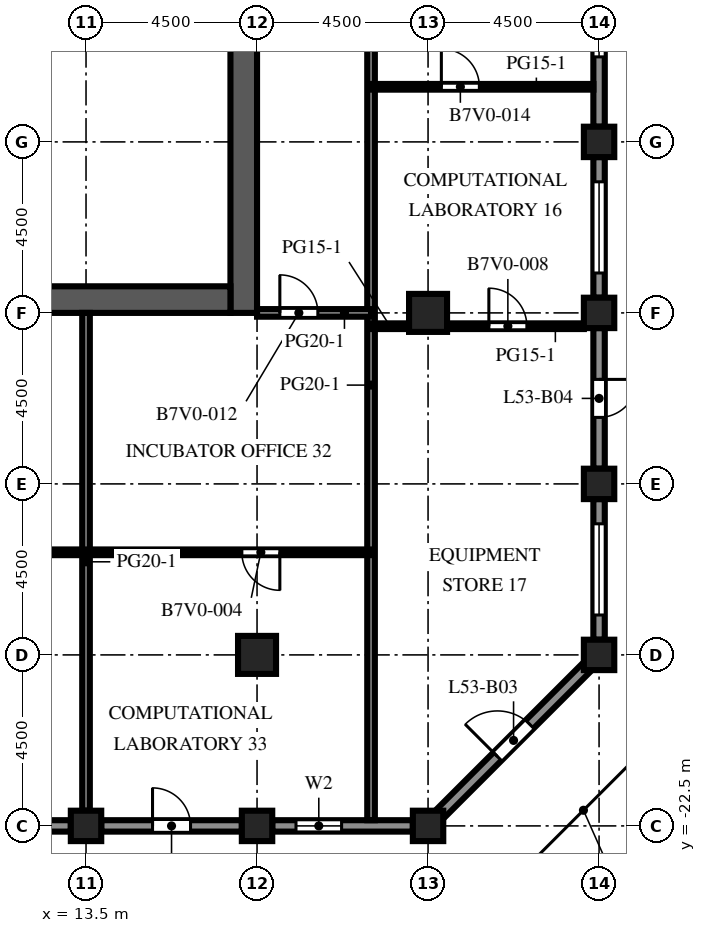
"""IFC4 building model, lengths in metres.
Left out: names, types, materials, properties, quantities, classifications, styles, units other than length and angle.
Written with IfcOpenShell. Run it as: python <this file> out.ifc"""

import sys

from ifc_helpers import new_model, si_unit, direction, frame, frame_2d, origin, origin_2d, place, context, subcontext, project, spatial, rectangle, extrude, element, fill, save


model = new_model("IFC4")
c1 = context("Model", 3, precision=1e-05, world=origin(), true_north=direction((0.0, 1.0)))
c2 = subcontext(c1, "Body", "Model", "MODEL_VIEW")
j1 = project(units=[si_unit("LENGTHUNIT", "METRE"), si_unit("PLANEANGLEUNIT", "RADIAN")], contexts=[c1])
p1 = place(None, origin())
s1 = spatial("IfcSite", under=j1, at=p1, CompositionType="ELEMENT")
p2 = place(p1, origin())
s2 = spatial("IfcBuilding", under=s1, at=p2, CompositionType="ELEMENT")
p3 = place(p2, frame((0.0, 0.0, 235.7)))
s3 = spatial("IfcBuildingStorey", under=s2, at=p3, CompositionType="ELEMENT", Elevation=235.7)
for number, where, z_axis, x_axis in (
    (1, (13.5, -22.5, 0.0), (0.0, 0.0, 1.0), (1.0, 0.0, 0.0)),
    (2, (18.0, -22.5, 0.0), (0.0, 0.0, 1.0), (1.0, 0.0, 0.0)),
    (3, (22.5, -22.5, 0.0), (0.0, 0.0, 1.0), (1.0, 0.0, 0.0)),
    (4, (27.0, -18.0, 0.0), (0.0, 0.0, 1.0), (1.0, 0.0, 0.0)),
    (5, (27.0, -13.5, 0.0), (0.0, 0.0, 1.0), (1.0, 0.0, 0.0)),
    (6, (27.0, -9.0, 0.0), (0.0, 0.0, 1.0), (1.0, 0.0, 0.0)),
    (7, (27.0, -4.5, 0.0), (0.0, 0.0, 1.0), (1.0, 0.0, 0.0)),
):
    element("IfcColumn", number, at=place(p3, frame(where, z_axis=z_axis, x_axis=x_axis)), inside=s3, PredefinedType="COLUMN", context=c2, shape_type="SweptSolid", body=[
        extrude(rectangle(XDim=0.8, YDim=0.8, at=origin_2d()), origin(), (0.0, 0.0, 1.0), 4.1),
    ])
for number, where, z_axis, x_axis in (
    (8, (18.0, -18.0, 0.0), (0.0, 0.0, 1.0), (1.0, 0.0, 0.0)),
    (9, (22.5, -9.0, 0.0), (0.0, 0.0, 1.0), (1.0, 0.0, 0.0)),
):
    element("IfcColumn", number, at=place(p3, frame(where, z_axis=z_axis, x_axis=x_axis)), inside=s3, PredefinedType="COLUMN", context=c2, shape_type="SweptSolid", body=[
        extrude(rectangle(XDim=1.0, YDim=1.0, at=origin_2d()), origin(), (0.0, 0.0, 1.0), 4.1),
    ])
p4 = place(p3, frame((17.65, -9.0, 0.0), z_axis=(0.0, 0.0, 1.0), x_axis=(0.0, 1.0, 0.0)))
e10 = element("IfcWall", 10, at=p4, inside=s3, PredefinedType="SHEAR", context=c2, shape_type="SweptSolid", body=[
    extrude(rectangle(XDim=27.5, YDim=0.7, at=frame_2d((13.75, 0.0))), origin(), (0.0, 0.0, 1.0), 4.1),
])
p5 = place(p4, frame((12.55, 0.0, 0.0)))
e11 = element("IfcOpeningElement", 11, at=p5, cuts=e10, PredefinedType="OPENING", context=c2, shape_type="SweptSolid", body=[
    extrude(rectangle(XDim=2.4, YDim=2.4, at=frame_2d((1.2, 1.2))), frame((0.0, 0.36, 0.0), z_axis=(0.0, -1.0, 0.0), x_axis=(1.0, 0.0, 0.0)), (0.0, 0.0, 1.0), 0.72),
])
p6 = place(p4, frame((6.825, 0.0, 0.0)))
e12 = element("IfcOpeningElement", 12, at=p6, cuts=e10, PredefinedType="OPENING", context=c2, shape_type="SweptSolid", body=[
    extrude(rectangle(XDim=1.2, YDim=2.1, at=frame_2d((0.6, 1.05))), frame((0.0, 0.36, 0.0), z_axis=(0.0, -1.0, 0.0), x_axis=(1.0, 0.0, 0.0)), (0.0, 0.0, 1.0), 0.72),
])
p7 = place(p4, frame((19.475, 0.0, 0.0)))
e13 = element("IfcOpeningElement", 13, at=p7, cuts=e10, PredefinedType="OPENING", context=c2, shape_type="SweptSolid", body=[
    extrude(rectangle(XDim=1.2, YDim=2.1, at=frame_2d((0.6, 1.05))), frame((0.0, 0.36, 0.0), z_axis=(0.0, -1.0, 0.0), x_axis=(1.0, 0.0, 0.0)), (0.0, 0.0, 1.0), 0.72),
])
p8 = place(p3, frame((6.7, -8.65, 0.0), z_axis=(0.0, 0.0, 1.0), x_axis=(1.0, 0.0, 0.0)))
e14 = element("IfcWall", 14, at=p8, inside=s3, PredefinedType="SHEAR", context=c2, shape_type="SweptSolid", body=[
    extrude(rectangle(XDim=10.6, YDim=0.7, at=frame_2d((5.3, 0.0))), origin(), (0.0, 0.0, 1.0), 4.1),
])
p9 = place(p3, frame((13.1, -22.5, 0.0), z_axis=(0.0, 0.0, 1.0), x_axis=(-1.0, 0.0, 0.0)))
e15 = element("IfcWall", 15, at=p9, inside=s3, PredefinedType="SOLIDWALL", context=c2, shape_type="SweptSolid", body=[
    extrude(rectangle(XDim=3.7, YDim=0.3, at=frame_2d((1.85, 0.0))), origin(), (0.0, 0.0, 1.0), 2.85),
])
p10 = place(p9, frame((0.65, 0.0, 0.8)))
e16 = element("IfcOpeningElement", 16, at=p10, cuts=e15, PredefinedType="OPENING", context=c2, shape_type="SweptSolid", body=[
    extrude(rectangle(XDim=2.4, YDim=1.7, at=frame_2d((1.2, 0.85))), frame((0.0, 0.16, 0.0), z_axis=(0.0, -1.0, 0.0), x_axis=(1.0, 0.0, 0.0)), (0.0, 0.0, 1.0), 0.32),
])
p11 = place(p3, frame((17.6, -22.5, 0.0), z_axis=(0.0, 0.0, 1.0), x_axis=(-1.0, 0.0, 0.0)))
e17 = element("IfcWall", 17, at=p11, inside=s3, PredefinedType="SOLIDWALL", context=c2, shape_type="SweptSolid", body=[
    extrude(rectangle(XDim=3.7, YDim=0.3, at=frame_2d((1.85, 0.0))), origin(), (0.0, 0.0, 1.0), 2.85),
])
p12 = place(p11, frame((1.35, 0.0, 0.0)))
e18 = element("IfcOpeningElement", 18, at=p12, cuts=e17, PredefinedType="OPENING", context=c2, shape_type="SweptSolid", body=[
    extrude(rectangle(XDim=1.0, YDim=2.2, at=frame_2d((0.5, 1.1))), frame((0.0, 0.16, 0.0), z_axis=(0.0, -1.0, 0.0), x_axis=(1.0, 0.0, 0.0)), (0.0, 0.0, 1.0), 0.32),
])
p13 = place(p3, frame((22.1, -22.5, 0.0), z_axis=(0.0, 0.0, 1.0), x_axis=(-1.0, 0.0, 0.0)))
e19 = element("IfcWall", 19, at=p13, inside=s3, PredefinedType="SOLIDWALL", context=c2, shape_type="SweptSolid", body=[
    extrude(rectangle(XDim=3.7, YDim=0.3, at=frame_2d((1.85, 0.0))), origin(), (0.0, 0.0, 1.0), 2.85),
])
p14 = place(p13, frame((1.875, 0.0, 0.8)))
e20 = element("IfcOpeningElement", 20, at=p14, cuts=e19, PredefinedType="OPENING", context=c2, shape_type="SweptSolid", body=[
    extrude(rectangle(XDim=1.2, YDim=1.7, at=frame_2d((0.6, 0.85))), frame((0.0, 0.16, 0.0), z_axis=(0.0, -1.0, 0.0), x_axis=(1.0, 0.0, 0.0)), (0.0, 0.0, 1.0), 0.32),
])
p15 = place(p3, frame((26.706, -18.294, 0.0), z_axis=(0.0, 0.0, 1.0), x_axis=(-0.707106781187, -0.707106781187, 0.0)))
e21 = element("IfcWall", 21, at=p15, inside=s3, PredefinedType="SOLIDWALL", context=c2, shape_type="SweptSolid", body=[
    extrude(rectangle(XDim=5.532, YDim=0.3, at=frame_2d((2.766, 0.0))), origin(), (0.0, 0.0, 1.0), 2.85),
])
p16 = place(p15, frame((2.166, 0.0, 0.0)))
e22 = element("IfcOpeningElement", 22, at=p16, cuts=e21, PredefinedType="OPENING", context=c2, shape_type="SweptSolid", body=[
    extrude(rectangle(XDim=1.2, YDim=2.2, at=frame_2d((0.6, 1.1))), frame((0.0, 0.16, 0.0), z_axis=(0.0, -1.0, 0.0), x_axis=(1.0, 0.0, 0.0)), (0.0, 0.0, 1.0), 0.32),
])
p17 = place(p3, frame((27.0, -13.9, 0.0), z_axis=(0.0, 0.0, 1.0), x_axis=(0.0, -1.0, 0.0)))
e23 = element("IfcWall", 23, at=p17, inside=s3, PredefinedType="SOLIDWALL", context=c2, shape_type="SweptSolid", body=[
    extrude(rectangle(XDim=3.7, YDim=0.3, at=frame_2d((1.85, 0.0))), origin(), (0.0, 0.0, 1.0), 2.85),
])
p18 = place(p17, frame((0.65, 0.0, 0.8)))
e24 = element("IfcOpeningElement", 24, at=p18, cuts=e23, PredefinedType="OPENING", context=c2, shape_type="SweptSolid", body=[
    extrude(rectangle(XDim=2.4, YDim=1.7, at=frame_2d((1.2, 0.85))), frame((0.0, 0.16, 0.0), z_axis=(0.0, -1.0, 0.0), x_axis=(1.0, 0.0, 0.0)), (0.0, 0.0, 1.0), 0.32),
])
p19 = place(p3, frame((27.0, -9.4, 0.0), z_axis=(0.0, 0.0, 1.0), x_axis=(0.0, -1.0, 0.0)))
e25 = element("IfcWall", 25, at=p19, inside=s3, PredefinedType="SOLIDWALL", context=c2, shape_type="SweptSolid", body=[
    extrude(rectangle(XDim=3.7, YDim=0.3, at=frame_2d((1.85, 0.0))), origin(), (0.0, 0.0, 1.0), 2.85),
])
p20 = place(p19, frame((1.35, 0.0, 0.0)))
e26 = element("IfcOpeningElement", 26, at=p20, cuts=e25, PredefinedType="OPENING", context=c2, shape_type="SweptSolid", body=[
    extrude(rectangle(XDim=1.0, YDim=2.2, at=frame_2d((0.5, 1.1))), frame((0.0, 0.16, 0.0), z_axis=(0.0, -1.0, 0.0), x_axis=(1.0, 0.0, 0.0)), (0.0, 0.0, 1.0), 0.32),
])
p21 = place(p3, frame((27.0, -4.9, 0.0), z_axis=(0.0, 0.0, 1.0), x_axis=(0.0, -1.0, 0.0)))
e27 = element("IfcWall", 27, at=p21, inside=s3, PredefinedType="SOLIDWALL", context=c2, shape_type="SweptSolid", body=[
    extrude(rectangle(XDim=3.7, YDim=0.3, at=frame_2d((1.85, 0.0))), origin(), (0.0, 0.0, 1.0), 2.85),
])
p22 = place(p21, frame((0.65, 0.0, 0.8)))
e28 = element("IfcOpeningElement", 28, at=p22, cuts=e27, PredefinedType="OPENING", context=c2, shape_type="SweptSolid", body=[
    extrude(rectangle(XDim=2.4, YDim=1.7, at=frame_2d((1.2, 0.85))), frame((0.0, 0.16, 0.0), z_axis=(0.0, -1.0, 0.0), x_axis=(1.0, 0.0, 0.0)), (0.0, 0.0, 1.0), 0.32),
])
p23 = place(p3, frame((27.0, -0.4, 0.0), z_axis=(0.0, 0.0, 1.0), x_axis=(0.0, -1.0, 0.0)))
e29 = element("IfcWall", 29, at=p23, inside=s3, PredefinedType="SOLIDWALL", context=c2, shape_type="SweptSolid", body=[
    extrude(rectangle(XDim=3.7, YDim=0.3, at=frame_2d((1.85, 0.0))), origin(), (0.0, 0.0, 1.0), 2.85),
])
p24 = place(p23, frame((0.663, 0.0, 0.8)))
e30 = element("IfcOpeningElement", 30, at=p24, cuts=e29, PredefinedType="OPENING", context=c2, shape_type="SweptSolid", body=[
    extrude(rectangle(XDim=1.2, YDim=1.7, at=frame_2d((0.6, 0.85))), frame((0.0, 0.16, 0.0), z_axis=(0.0, -1.0, 0.0), x_axis=(1.0, 0.0, 0.0)), (0.0, 0.0, 1.0), 0.32),
])
p25 = place(p3, frame((13.5, -22.1, 0.0), z_axis=(0.0, 0.0, 1.0), x_axis=(0.0, 1.0, 0.0)))
e31 = element("IfcWall", 31, at=p25, inside=s3, PredefinedType="PARTITIONING", context=c2, shape_type="SweptSolid", body=[
    extrude(rectangle(XDim=13.1, YDim=0.2, at=frame_2d((6.55, 0.0))), origin(), (0.0, 0.0, 1.0), 3.65),
])
p26 = place(p3, frame((21.0, 3.25, 0.0), z_axis=(0.0, 0.0, 1.0), x_axis=(0.0, -1.0, 0.0)))
e32 = element("IfcWall", 32, at=p26, inside=s3, PredefinedType="PARTITIONING", context=c2, shape_type="SweptSolid", body=[
    extrude(rectangle(XDim=25.6, YDim=0.2, at=frame_2d((12.8, 0.0))), origin(), (0.0, 0.0, 1.0), 3.65),
])
p27 = place(p26, frame((1.7, 0.0, 0.0)))
e33 = element("IfcOpeningElement", 33, at=p27, cuts=e32, PredefinedType="OPENING", context=c2, shape_type="SweptSolid", body=[
    extrude(rectangle(XDim=1.0, YDim=2.1, at=frame_2d((0.5, 1.05))), frame((0.0, 0.11, 0.0), z_axis=(0.0, -1.0, 0.0), x_axis=(1.0, 0.0, 0.0)), (0.0, 0.0, 1.0), 0.22),
])
p28 = place(p3, frame((21.0, -15.3, 0.0), z_axis=(0.0, 0.0, 1.0), x_axis=(-1.0, 0.0, 0.0)))
e34 = element("IfcWall", 34, at=p28, inside=s3, PredefinedType="PARTITIONING", context=c2, shape_type="SweptSolid", body=[
    extrude(rectangle(XDim=34.5, YDim=0.15, at=frame_2d((17.25, 0.0))), origin(), (0.0, 0.0, 1.0), 3.65),
])
p29 = place(p28, frame((32.4, 0.0, 0.0)))
e35 = element("IfcOpeningElement", 35, at=p29, cuts=e34, PredefinedType="OPENING", context=c2, shape_type="SweptSolid", body=[
    extrude(rectangle(XDim=1.0, YDim=2.1, at=frame_2d((0.5, 1.05))), frame((0.0, 0.085, 0.0), z_axis=(0.0, -1.0, 0.0), x_axis=(1.0, 0.0, 0.0)), (0.0, 0.0, 1.0), 0.17),
])
p30 = place(p28, frame((23.4, 0.0, 0.0)))
e36 = element("IfcOpeningElement", 36, at=p30, cuts=e34, PredefinedType="OPENING", context=c2, shape_type="SweptSolid", body=[
    extrude(rectangle(XDim=1.0, YDim=2.1, at=frame_2d((0.5, 1.05))), frame((0.0, 0.085, 0.0), z_axis=(0.0, -1.0, 0.0), x_axis=(1.0, 0.0, 0.0)), (0.0, 0.0, 1.0), 0.17),
])
p31 = place(p28, frame((11.4, 0.0, 0.0)))
e37 = element("IfcOpeningElement", 37, at=p31, cuts=e34, PredefinedType="OPENING", context=c2, shape_type="SweptSolid", body=[
    extrude(rectangle(XDim=1.0, YDim=2.1, at=frame_2d((0.5, 1.05))), frame((0.0, 0.085, 0.0), z_axis=(0.0, -1.0, 0.0), x_axis=(1.0, 0.0, 0.0)), (0.0, 0.0, 1.0), 0.17),
])
p32 = place(p28, frame((2.4, 0.0, 0.0)))
e38 = element("IfcOpeningElement", 38, at=p32, cuts=e34, PredefinedType="OPENING", context=c2, shape_type="SweptSolid", body=[
    extrude(rectangle(XDim=1.0, YDim=2.1, at=frame_2d((0.5, 1.05))), frame((0.0, 0.085, 0.0), z_axis=(0.0, -1.0, 0.0), x_axis=(1.0, 0.0, 0.0)), (0.0, 0.0, 1.0), 0.17),
])
p33 = place(p3, frame((21.0, -9.35, 0.0), z_axis=(0.0, 0.0, 1.0), x_axis=(1.0, 0.0, 0.0)))
e39 = element("IfcWall", 39, at=p33, inside=s3, PredefinedType="PARTITIONING", context=c2, shape_type="SweptSolid", body=[
    extrude(rectangle(XDim=1.0, YDim=0.15, at=frame_2d((0.5, 0.0))), origin(), (0.0, 0.0, 1.0), 3.65),
])
p34 = place(p3, frame((26.6, -9.35, 0.0), z_axis=(0.0, 0.0, 1.0), x_axis=(-1.0, 0.0, 0.0)))
e40 = element("IfcWall", 40, at=p34, inside=s3, PredefinedType="PARTITIONING", context=c2, shape_type="SweptSolid", body=[
    extrude(rectangle(XDim=3.6, YDim=0.15, at=frame_2d((1.8, 0.0))), origin(), (0.0, 0.0, 1.0), 3.65),
])
p35 = place(p34, frame((1.5, 0.0, 0.0)))
e41 = element("IfcOpeningElement", 41, at=p35, cuts=e40, PredefinedType="OPENING", context=c2, shape_type="SweptSolid", body=[
    extrude(rectangle(XDim=1.0, YDim=2.1, at=frame_2d((0.5, 1.05))), frame((0.0, 0.085, 0.0), z_axis=(0.0, -1.0, 0.0), x_axis=(1.0, 0.0, 0.0)), (0.0, 0.0, 1.0), 0.17),
])
p36 = place(p3, frame((21.0, -9.0, 0.0), z_axis=(0.0, 0.0, 1.0), x_axis=(-1.0, 0.0, 0.0)))
e42 = element("IfcWall", 42, at=p36, inside=s3, PredefinedType="PARTITIONING", context=c2, shape_type="SweptSolid", body=[
    extrude(rectangle(XDim=3.0, YDim=0.2, at=frame_2d((1.5, 0.0))), origin(), (0.0, 0.0, 1.0), 3.65),
])
p37 = place(p36, frame((1.4, 0.0, 0.0)))
e43 = element("IfcOpeningElement", 43, at=p37, cuts=e42, PredefinedType="OPENING", context=c2, shape_type="SweptSolid", body=[
    extrude(rectangle(XDim=1.0, YDim=2.1, at=frame_2d((0.5, 1.05))), frame((0.0, 0.11, 0.0), z_axis=(0.0, -1.0, 0.0), x_axis=(1.0, 0.0, 0.0)), (0.0, 0.0, 1.0), 0.22),
])
p38 = place(p3, frame((26.85, -3.05, 0.0), z_axis=(0.0, 0.0, 1.0), x_axis=(-1.0, 0.0, 0.0)))
e44 = element("IfcWall", 44, at=p38, inside=s3, PredefinedType="PARTITIONING", context=c2, shape_type="SweptSolid", body=[
    extrude(rectangle(XDim=5.85, YDim=0.15, at=frame_2d((2.925, 0.0))), origin(), (0.0, 0.0, 1.0), 3.65),
])
p39 = place(p38, frame((3.0, 0.0, 0.0)))
e45 = element("IfcOpeningElement", 45, at=p39, cuts=e44, PredefinedType="OPENING", context=c2, shape_type="SweptSolid", body=[
    extrude(rectangle(XDim=1.0, YDim=2.1, at=frame_2d((0.5, 1.05))), frame((0.0, 0.085, 0.0), z_axis=(0.0, -1.0, 0.0), x_axis=(1.0, 0.0, 0.0)), (0.0, 0.0, 1.0), 0.17),
])
p40 = place(p12, origin())
e46 = element("IfcDoor", 46, at=p40, inside=s3, OperationType="SINGLE_SWING_RIGHT", PredefinedType="DOOR", context=c2, shape_type="SweptSolid", body=[
    extrude(rectangle(XDim=1.0, YDim=2.2, at=frame_2d((0.5, 1.1))), frame((0.0, 0.025, 0.0), z_axis=(0.0, -1.0, 0.0), x_axis=(1.0, 0.0, 0.0)), (0.0, 0.0, 1.0), 0.05),
])
fill(e18, e46)
p41 = place(p14, origin())
e47 = element("IfcWindow", 47, at=p41, inside=s3, PartitioningType="SINGLE_PANEL", PredefinedType="WINDOW", context=c2, shape_type="SweptSolid", body=[
    extrude(rectangle(XDim=1.2, YDim=1.7, at=frame_2d((0.6, 0.85))), frame((0.0, 0.03, 0.0), z_axis=(0.0, -1.0, 0.0), x_axis=(1.0, 0.0, 0.0)), (0.0, 0.0, 1.0), 0.06),
])
fill(e20, e47)
p42 = place(p16, origin())
e48 = element("IfcDoor", 48, at=p42, inside=s3, OperationType="SINGLE_SWING_RIGHT", PredefinedType="DOOR", context=c2, shape_type="SweptSolid", body=[
    extrude(rectangle(XDim=1.2, YDim=2.2, at=frame_2d((0.6, 1.1))), frame((0.0, 0.025, 0.0), z_axis=(0.0, -1.0, 0.0), x_axis=(1.0, 0.0, 0.0)), (0.0, 0.0, 1.0), 0.05),
])
fill(e22, e48)
p43 = place(p18, origin())
e49 = element("IfcWindow", 49, at=p43, inside=s3, PartitioningType="SINGLE_PANEL", PredefinedType="WINDOW", context=c2, shape_type="SweptSolid", body=[
    extrude(rectangle(XDim=2.4, YDim=1.7, at=frame_2d((1.2, 0.85))), frame((0.0, 0.03, 0.0), z_axis=(0.0, -1.0, 0.0), x_axis=(1.0, 0.0, 0.0)), (0.0, 0.0, 1.0), 0.06),
])
fill(e24, e49)
p44 = place(p20, origin())
e50 = element("IfcDoor", 50, at=p44, inside=s3, OperationType="SINGLE_SWING_LEFT", PredefinedType="DOOR", context=c2, shape_type="SweptSolid", body=[
    extrude(rectangle(XDim=1.0, YDim=2.2, at=frame_2d((0.5, 1.1))), frame((0.0, 0.025, 0.0), z_axis=(0.0, -1.0, 0.0), x_axis=(1.0, 0.0, 0.0)), (0.0, 0.0, 1.0), 0.05),
])
fill(e26, e50)
p45 = place(p22, origin())
e51 = element("IfcWindow", 51, at=p45, inside=s3, PartitioningType="SINGLE_PANEL", PredefinedType="WINDOW", context=c2, shape_type="SweptSolid", body=[
    extrude(rectangle(XDim=2.4, YDim=1.7, at=frame_2d((1.2, 0.85))), frame((0.0, 0.03, 0.0), z_axis=(0.0, -1.0, 0.0), x_axis=(1.0, 0.0, 0.0)), (0.0, 0.0, 1.0), 0.06),
])
fill(e28, e51)
p46 = place(p24, origin())
e52 = element("IfcWindow", 52, at=p46, inside=s3, PartitioningType="SINGLE_PANEL", PredefinedType="WINDOW", context=c2, shape_type="SweptSolid", body=[
    extrude(rectangle(XDim=1.2, YDim=1.7, at=frame_2d((0.6, 0.85))), frame((0.0, 0.03, 0.0), z_axis=(0.0, -1.0, 0.0), x_axis=(1.0, 0.0, 0.0)), (0.0, 0.0, 1.0), 0.06),
])
fill(e30, e52)
p47 = place(p6, frame((1.2, 0.0, 0.0), z_axis=(0.0, 0.0, 1.0), x_axis=(-1.0, 0.0, 0.0)))
e53 = element("IfcDoor", 53, at=p47, inside=s3, OperationType="SINGLE_SWING_LEFT", PredefinedType="DOOR", context=c2, shape_type="SweptSolid", body=[
    extrude(rectangle(XDim=1.2, YDim=2.1, at=frame_2d((0.6, 1.05))), frame((0.0, 0.025, 0.0), z_axis=(0.0, -1.0, 0.0), x_axis=(1.0, 0.0, 0.0)), (0.0, 0.0, 1.0), 0.05),
])
fill(e12, e53)
p48 = place(p32, origin())
e54 = element("IfcDoor", 54, at=p48, inside=s3, OperationType="SINGLE_SWING_LEFT", PredefinedType="DOOR", context=c2, shape_type="SweptSolid", body=[
    extrude(rectangle(XDim=1.0, YDim=2.1, at=frame_2d((0.5, 1.05))), frame((0.0, 0.025, 0.0), z_axis=(0.0, -1.0, 0.0), x_axis=(1.0, 0.0, 0.0)), (0.0, 0.0, 1.0), 0.05),
])
fill(e38, e54)
p49 = place(p35, origin())
e55 = element("IfcDoor", 55, at=p49, inside=s3, OperationType="SINGLE_SWING_RIGHT", PredefinedType="DOOR", context=c2, shape_type="SweptSolid", body=[
    extrude(rectangle(XDim=1.0, YDim=2.1, at=frame_2d((0.5, 1.05))), frame((0.0, 0.025, 0.0), z_axis=(0.0, -1.0, 0.0), x_axis=(1.0, 0.0, 0.0)), (0.0, 0.0, 1.0), 0.05),
])
fill(e41, e55)
p50 = place(p37, origin())
e56 = element("IfcDoor", 56, at=p50, inside=s3, OperationType="SINGLE_SWING_RIGHT", PredefinedType="DOOR", context=c2, shape_type="SweptSolid", body=[
    extrude(rectangle(XDim=1.0, YDim=2.1, at=frame_2d((0.5, 1.05))), frame((0.0, 0.025, 0.0), z_axis=(0.0, -1.0, 0.0), x_axis=(1.0, 0.0, 0.0)), (0.0, 0.0, 1.0), 0.05),
])
fill(e43, e56)
p51 = place(p39, origin())
e57 = element("IfcDoor", 57, at=p51, inside=s3, OperationType="SINGLE_SWING_RIGHT", PredefinedType="DOOR", context=c2, shape_type="SweptSolid", body=[
    extrude(rectangle(XDim=1.0, YDim=2.1, at=frame_2d((0.5, 1.05))), frame((0.0, 0.025, 0.0), z_axis=(0.0, -1.0, 0.0), x_axis=(1.0, 0.0, 0.0)), (0.0, 0.0, 1.0), 0.05),
])
fill(e45, e57)
save(model, sys.argv[1])
